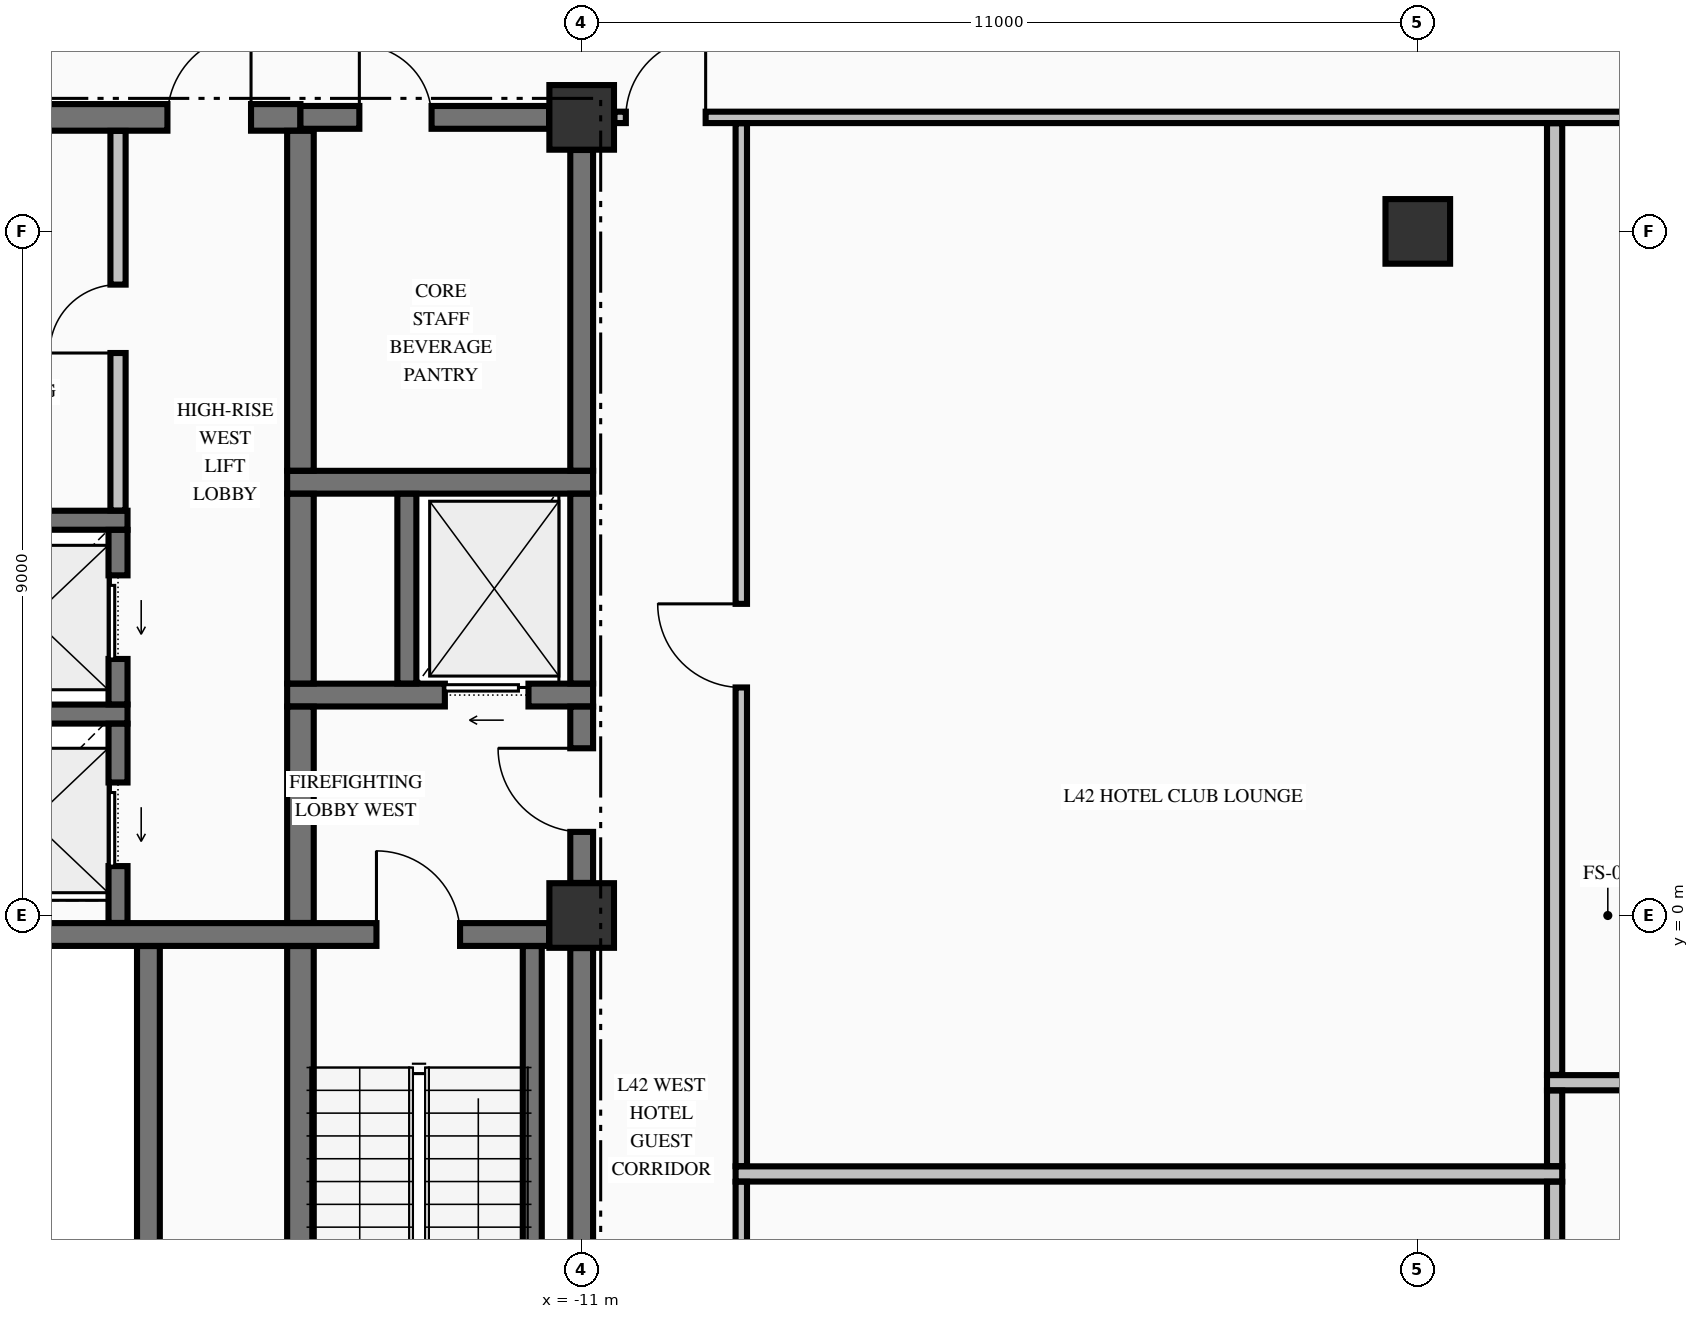
"""IFC4 building model, lengths in metres.
Left out: names, types, materials, properties, quantities, classifications, styles, units other than length and angle.
Written with IfcOpenShell. Run it as: python <this file> out.ifc"""

import sys

from ifc_helpers import new_model, si_unit, direction, frame, frame_2d, origin, origin_2d, place, context, subcontext, project, spatial, rectangle, extrude, element, fill, save


model = new_model("IFC4")
c1 = context("Model", 3, precision=1e-05, world=origin(), true_north=direction((0.0, 1.0)))
c2 = subcontext(c1, "Body", "Model", "MODEL_VIEW")
j1 = project(units=[si_unit("LENGTHUNIT", "METRE"), si_unit("PLANEANGLEUNIT", "RADIAN")], contexts=[c1])
p1 = place(None, origin())
s1 = spatial("IfcSite", under=j1, at=p1, CompositionType="ELEMENT")
p2 = place(p1, origin())
s2 = spatial("IfcBuilding", under=s1, at=p2, CompositionType="ELEMENT")
p3 = place(p2, frame((0.0, 0.0, 166.06)))
s3 = spatial("IfcBuildingStorey", under=s2, at=p3, CompositionType="ELEMENT", Elevation=166.06)
for number, where, z_axis, x_axis in (
    (1, (-11.0, 0.0, -0.25), (0.0, 0.0, 1.0), (1.0, 0.0, 0.0)),
    (2, (-11.0, 10.5, -0.25), (0.0, 0.0, 1.0), (1.0, 0.0, 0.0)),
    (3, (0.0, 9.0, -0.25), (0.0, 0.0, 1.0), (1.0, 0.0, 0.0)),
):
    element("IfcColumn", number, at=place(p3, frame(where, z_axis=z_axis, x_axis=x_axis)), inside=s3, PredefinedType="COLUMN", context=c2, shape_type="SweptSolid", body=[
        extrude(rectangle(XDim=0.85, YDim=0.85, at=origin_2d()), origin(), (0.0, 0.0, 1.0), 3.4),
    ])
p4 = place(p3, frame((-19.571, -0.25, 0.0), z_axis=(0.0, 0.0, 1.0), x_axis=(1.0, 0.0, 0.0)))
e4 = element("IfcWall", 4, at=p4, inside=s3, PredefinedType="SHEAR", context=c2, shape_type="SweptSolid", body=[
    extrude(rectangle(XDim=8.142, YDim=0.3, at=frame_2d((4.071, 0.0))), origin(), (0.0, 0.0, 1.0), 3.15),
])
p5 = place(p4, frame((5.871, 0.0, 0.0)))
e5 = element("IfcOpeningElement", 5, at=p5, cuts=e4, PredefinedType="OPENING", context=c2, shape_type="SweptSolid", body=[
    extrude(rectangle(XDim=1.1, YDim=2.15, at=frame_2d((0.55, 1.075))), frame((0.0, 0.16, 0.0), z_axis=(0.0, -1.0, 0.0), x_axis=(1.0, 0.0, 0.0)), (0.0, 0.0, 1.0), 0.32),
])
p6 = place(p3, frame((-20.175, 2.65, 0.0), z_axis=(0.0, 0.0, 1.0), x_axis=(1.0, 0.0, 0.0)))
e6 = element("IfcWall", 6, at=p6, inside=s3, PredefinedType="SOLIDWALL", context=c2, shape_type="SweptSolid", body=[
    extrude(rectangle(XDim=3.2, YDim=0.25, at=frame_2d((1.6, 0.0))), origin(), (0.0, 0.0, 1.0), 3.15),
])
p7 = place(p3, frame((-14.875, 2.9, 0.0), z_axis=(0.0, 0.0, 1.0), x_axis=(1.0, 0.0, 0.0)))
e7 = element("IfcWall", 7, at=p7, inside=s3, PredefinedType="SHEAR", context=c2, shape_type="SweptSolid", body=[
    extrude(rectangle(XDim=4.025, YDim=0.3, at=frame_2d((2.012, 0.0))), origin(), (0.0, 0.0, 1.0), 3.15),
])
p8 = place(p7, frame((2.075, 0.0, 0.0)))
e8 = element("IfcOpeningElement", 8, at=p8, cuts=e7, PredefinedType="OPENING", context=c2, shape_type="SweptSolid", body=[
    extrude(rectangle(XDim=1.1, YDim=2.2, at=frame_2d((0.55, 1.1))), frame((0.0, 0.16, 0.0), z_axis=(0.0, -1.0, 0.0), x_axis=(1.0, 0.0, 0.0)), (0.0, 0.0, 1.0), 0.32),
])
p9 = place(p3, frame((-20.175, 5.2, 0.0), z_axis=(0.0, 0.0, 1.0), x_axis=(1.0, 0.0, 0.0)))
e9 = element("IfcWall", 9, at=p9, inside=s3, PredefinedType="SOLIDWALL", context=c2, shape_type="SweptSolid", body=[
    extrude(rectangle(XDim=3.2, YDim=0.25, at=frame_2d((1.6, 0.0))), origin(), (0.0, 0.0, 1.0), 3.15),
])
p10 = place(p3, frame((-14.875, 5.7, 0.0), z_axis=(0.0, 0.0, 1.0), x_axis=(1.0, 0.0, 0.0)))
e10 = element("IfcWall", 10, at=p10, inside=s3, PredefinedType="SHEAR", context=c2, shape_type="SweptSolid", body=[
    extrude(rectangle(XDim=4.025, YDim=0.3, at=frame_2d((2.012, 0.0))), origin(), (0.0, 0.0, 1.0), 3.15),
])
p11 = place(p3, frame((-19.571, 10.5, 0.0), z_axis=(0.0, 0.0, 1.0), x_axis=(1.0, 0.0, 0.0)))
e11 = element("IfcWall", 11, at=p11, inside=s3, PredefinedType="SHEAR", context=c2, shape_type="SweptSolid", body=[
    extrude(rectangle(XDim=4.871, YDim=0.35, at=frame_2d((2.436, 0.0))), origin(), (0.0, 0.0, 1.0), 3.15),
])
p12 = place(p11, frame((3.121, 0.0, 0.0)))
e12 = element("IfcOpeningElement", 12, at=p12, cuts=e11, PredefinedType="OPENING", context=c2, shape_type="SweptSolid", body=[
    extrude(rectangle(XDim=1.1, YDim=2.15, at=frame_2d((0.55, 1.075))), frame((0.0, 0.185, 0.0), z_axis=(0.0, -1.0, 0.0), x_axis=(1.0, 0.0, 0.0)), (0.0, 0.0, 1.0), 0.37),
])
p13 = place(p3, frame((-14.7, 10.5, 0.0), z_axis=(0.0, 0.0, 1.0), x_axis=(1.0, 0.0, 0.0)))
e13 = element("IfcWall", 13, at=p13, inside=s3, PredefinedType="SHEAR", context=c2, shape_type="SweptSolid", body=[
    extrude(rectangle(XDim=3.271, YDim=0.3, at=frame_2d((1.635, 0.0))), origin(), (0.0, 0.0, 1.0), 3.15),
])
p14 = place(p13, frame((0.775, 0.0, 0.0)))
e14 = element("IfcOpeningElement", 14, at=p14, cuts=e13, PredefinedType="OPENING", context=c2, shape_type="SweptSolid", body=[
    extrude(rectangle(XDim=0.95, YDim=2.15, at=frame_2d((0.475, 1.075))), frame((0.0, 0.16, 0.0), z_axis=(0.0, -1.0, 0.0), x_axis=(1.0, 0.0, 0.0)), (0.0, 0.0, 1.0), 0.32),
])
p15 = place(p3, frame((-8.975, -3.4, 0.0), z_axis=(0.0, 0.0, 1.0), x_axis=(1.0, 0.0, 0.0)))
e15 = element("IfcWall", 15, at=p15, inside=s3, PredefinedType="PARTITIONING", context=c2, shape_type="SweptSolid", body=[
    extrude(rectangle(XDim=10.875, YDim=0.2, at=frame_2d((5.438, 0.0))), origin(), (0.0, 0.0, 1.0), 3.15),
])
p16 = place(p3, frame((1.7, -2.2, 0.0), z_axis=(0.0, 0.0, 1.0), x_axis=(1.0, 0.0, 0.0)))
e16 = element("IfcWall", 16, at=p16, inside=s3, PredefinedType="PARTITIONING", context=c2, shape_type="SweptSolid", body=[
    extrude(rectangle(XDim=7.275, YDim=0.2, at=frame_2d((3.638, 0.0))), origin(), (0.0, 0.0, 1.0), 3.15),
])
p17 = place(p3, frame((-10.569, 10.5, 0.0), z_axis=(0.0, 0.0, 1.0), x_axis=(1.0, 0.0, 0.0)))
e17 = element("IfcWall", 17, at=p17, inside=s3, PredefinedType="PARTITIONING", context=c2, shape_type="SweptSolid", body=[
    extrude(rectangle(XDim=21.138, YDim=0.15, at=frame_2d((10.569, 0.0))), origin(), (0.0, 0.0, 1.0), 3.15),
])
p18 = place(p17, frame((0.15, 0.0, 0.0)))
e18 = element("IfcOpeningElement", 18, at=p18, cuts=e17, PredefinedType="OPENING", context=c2, shape_type="SweptSolid", body=[
    extrude(rectangle(XDim=1.05, YDim=2.15, at=frame_2d((0.525, 1.075))), frame((0.0, 0.085, 0.0), z_axis=(0.0, -1.0, 0.0), x_axis=(1.0, 0.0, 0.0)), (0.0, 0.0, 1.0), 0.17),
])
p19 = place(p17, frame((19.938, 0.0, 0.0)))
e19 = element("IfcOpeningElement", 19, at=p19, cuts=e17, PredefinedType="OPENING", context=c2, shape_type="SweptSolid", body=[
    extrude(rectangle(XDim=1.05, YDim=2.15, at=frame_2d((0.525, 1.075))), frame((0.0, 0.085, 0.0), z_axis=(0.0, -1.0, 0.0), x_axis=(1.0, 0.0, 0.0)), (0.0, 0.0, 1.0), 0.17),
])
p20 = place(p3, frame((-17.1, -0.098, 0.0), z_axis=(0.0, 0.0, 1.0), x_axis=(0.0, 1.0, 0.0)))
e20 = element("IfcWall", 20, at=p20, inside=s3, PredefinedType="SOLIDWALL", context=c2, shape_type="SweptSolid", body=[
    extrude(rectangle(XDim=2.621, YDim=0.25, at=frame_2d((1.311, 0.0))), origin(), (0.0, 0.0, 1.0), 3.15),
])
p21 = place(p20, frame((0.748, 0.0, 0.0)))
e21 = element("IfcOpeningElement", 21, at=p21, cuts=e20, PredefinedType="OPENING", context=c2, shape_type="SweptSolid", body=[
    extrude(rectangle(XDim=1.1, YDim=2.2, at=frame_2d((0.55, 1.1))), frame((0.0, 0.135, 0.0), z_axis=(0.0, -1.0, 0.0), x_axis=(1.0, 0.0, 0.0)), (0.0, 0.0, 1.0), 0.27),
])
p22 = place(p3, frame((-17.1, 2.777, 0.0), z_axis=(0.0, 0.0, 1.0), x_axis=(0.0, 1.0, 0.0)))
e22 = element("IfcWall", 22, at=p22, inside=s3, PredefinedType="SOLIDWALL", context=c2, shape_type="SweptSolid", body=[
    extrude(rectangle(XDim=2.296, YDim=0.25, at=frame_2d((1.148, 0.0))), origin(), (0.0, 0.0, 1.0), 3.15),
])
p23 = place(p22, frame((0.598, 0.0, 0.0)))
e23 = element("IfcOpeningElement", 23, at=p23, cuts=e22, PredefinedType="OPENING", context=c2, shape_type="SweptSolid", body=[
    extrude(rectangle(XDim=1.1, YDim=2.2, at=frame_2d((0.55, 1.1))), frame((0.0, 0.135, 0.0), z_axis=(0.0, -1.0, 0.0), x_axis=(1.0, 0.0, 0.0)), (0.0, 0.0, 1.0), 0.27),
])
p24 = place(p3, frame((-16.7, -9.773, 0.0), z_axis=(0.0, 0.0, 1.0), x_axis=(0.0, 1.0, 0.0)))
e24 = element("IfcWall", 24, at=p24, inside=s3, PredefinedType="SHEAR", context=c2, shape_type="SweptSolid", body=[
    extrude(rectangle(XDim=9.371, YDim=0.3, at=frame_2d((4.686, 0.0))), origin(), (0.0, 0.0, 1.0), 3.15),
])
p25 = place(p3, frame((-14.7, -9.773, 0.0), z_axis=(0.0, 0.0, 1.0), x_axis=(0.0, 1.0, 0.0)))
e25 = element("IfcWall", 25, at=p25, inside=s3, PredefinedType="SHEAR", context=c2, shape_type="SweptSolid", body=[
    extrude(rectangle(XDim=9.371, YDim=0.35, at=frame_2d((4.686, 0.0))), origin(), (0.0, 0.0, 1.0), 3.15),
])
p26 = place(p3, frame((-14.7, -0.098, 0.0), z_axis=(0.0, 0.0, 1.0), x_axis=(0.0, 1.0, 0.0)))
e26 = element("IfcWall", 26, at=p26, inside=s3, PredefinedType="SHEAR", context=c2, shape_type="SweptSolid", body=[
    extrude(rectangle(XDim=2.846, YDim=0.35, at=frame_2d((1.423, 0.0))), origin(), (0.0, 0.0, 1.0), 3.15),
])
p27 = place(p3, frame((-14.7, 3.052, 0.0), z_axis=(0.0, 0.0, 1.0), x_axis=(0.0, 1.0, 0.0)))
e27 = element("IfcWall", 27, at=p27, inside=s3, PredefinedType="SHEAR", context=c2, shape_type="SweptSolid", body=[
    extrude(rectangle(XDim=2.496, YDim=0.35, at=frame_2d((1.248, 0.0))), origin(), (0.0, 0.0, 1.0), 3.15),
])
p28 = place(p3, frame((-14.7, 5.852, 0.0), z_axis=(0.0, 0.0, 1.0), x_axis=(0.0, 1.0, 0.0)))
e28 = element("IfcWall", 28, at=p28, inside=s3, PredefinedType="SHEAR", context=c2, shape_type="SweptSolid", body=[
    extrude(rectangle(XDim=4.471, YDim=0.35, at=frame_2d((2.235, 0.0))), origin(), (0.0, 0.0, 1.0), 3.15),
])
p29 = place(p3, frame((-13.3, 3.052, 0.0), z_axis=(0.0, 0.0, 1.0), x_axis=(0.0, 1.0, 0.0)))
e29 = element("IfcWall", 29, at=p29, inside=s3, PredefinedType="SOLIDWALL", context=c2, shape_type="SweptSolid", body=[
    extrude(rectangle(XDim=2.496, YDim=0.25, at=frame_2d((1.248, 0.0))), origin(), (0.0, 0.0, 1.0), 3.15),
])
p30 = place(p3, frame((-11.65, -9.798, 0.0), z_axis=(0.0, 0.0, 1.0), x_axis=(0.0, 1.0, 0.0)))
e30 = element("IfcWall", 30, at=p30, inside=s3, PredefinedType="SOLIDWALL", context=c2, shape_type="SweptSolid", body=[
    extrude(rectangle(XDim=9.396, YDim=0.25, at=frame_2d((4.698, 0.0))), origin(), (0.0, 0.0, 1.0), 3.15),
])
p31 = place(p3, frame((-11.0, -9.521, 0.0), z_axis=(0.0, 0.0, 1.0), x_axis=(0.0, 1.0, 0.0)))
e31 = element("IfcWall", 31, at=p31, inside=s3, PredefinedType="SHEAR", context=c2, shape_type="SweptSolid", body=[
    extrude(rectangle(XDim=9.092, YDim=0.3, at=frame_2d((4.546, 0.0))), origin(), (0.0, 0.0, 1.0), 3.15),
])
p32 = place(p3, frame((-11.0, 0.429, 0.0), z_axis=(0.0, 0.0, 1.0), x_axis=(0.0, 1.0, 0.0)))
e32 = element("IfcWall", 32, at=p32, inside=s3, PredefinedType="SHEAR", context=c2, shape_type="SweptSolid", body=[
    extrude(rectangle(XDim=2.319, YDim=0.3, at=frame_2d((1.16, 0.0))), origin(), (0.0, 0.0, 1.0), 3.15),
])
p33 = place(p32, frame((0.671, 0.0, 0.0)))
e33 = element("IfcOpeningElement", 33, at=p33, cuts=e32, PredefinedType="OPENING", context=c2, shape_type="SweptSolid", body=[
    extrude(rectangle(XDim=1.1, YDim=2.15, at=frame_2d((0.55, 1.075))), frame((0.0, 0.16, 0.0), z_axis=(0.0, -1.0, 0.0), x_axis=(1.0, 0.0, 0.0)), (0.0, 0.0, 1.0), 0.32),
])
p34 = place(p3, frame((-11.0, 3.052, 0.0), z_axis=(0.0, 0.0, 1.0), x_axis=(0.0, 1.0, 0.0)))
e34 = element("IfcWall", 34, at=p34, inside=s3, PredefinedType="SHEAR", context=c2, shape_type="SweptSolid", body=[
    extrude(rectangle(XDim=2.496, YDim=0.3, at=frame_2d((1.248, 0.0))), origin(), (0.0, 0.0, 1.0), 3.15),
])
p35 = place(p3, frame((-11.0, 5.852, 0.0), z_axis=(0.0, 0.0, 1.0), x_axis=(0.0, 1.0, 0.0)))
e35 = element("IfcWall", 35, at=p35, inside=s3, PredefinedType="SHEAR", context=c2, shape_type="SweptSolid", body=[
    extrude(rectangle(XDim=4.219, YDim=0.3, at=frame_2d((2.109, 0.0))), origin(), (0.0, 0.0, 1.0), 3.15),
])
p36 = place(p3, frame((-17.1, 5.328, 0.0), z_axis=(0.0, 0.0, 1.0), x_axis=(0.0, 1.0, 0.0)))
e36 = element("IfcWall", 36, at=p36, inside=s3, PredefinedType="PARTITIONING", context=c2, shape_type="SweptSolid", body=[
    extrude(rectangle(XDim=4.994, YDim=0.2, at=frame_2d((2.497, 0.0))), origin(), (0.0, 0.0, 1.0), 3.15),
])
p37 = place(p36, frame((2.072, 0.0, 0.0)))
e37 = element("IfcOpeningElement", 37, at=p37, cuts=e36, PredefinedType="OPENING", context=c2, shape_type="SweptSolid", body=[
    extrude(rectangle(XDim=0.9, YDim=2.15, at=frame_2d((0.45, 1.075))), frame((0.0, 0.11, 0.0), z_axis=(0.0, -1.0, 0.0), x_axis=(1.0, 0.0, 0.0)), (0.0, 0.0, 1.0), 0.22),
])
p38 = place(p3, frame((-8.9, -9.872, 0.0), z_axis=(0.0, 0.0, 1.0), x_axis=(0.0, 1.0, 0.0)))
e38 = element("IfcWall", 38, at=p38, inside=s3, PredefinedType="PARTITIONING", context=c2, shape_type="SweptSolid", body=[
    extrude(rectangle(XDim=6.369, YDim=0.15, at=frame_2d((3.185, 0.0))), origin(), (0.0, 0.0, 1.0), 3.15),
])
p39 = place(p38, frame((2.702, 0.0, 0.0)))
e39 = element("IfcOpeningElement", 39, at=p39, cuts=e38, PredefinedType="OPENING", context=c2, shape_type="SweptSolid", body=[
    extrude(rectangle(XDim=1.0, YDim=2.15, at=frame_2d((0.5, 1.075))), frame((0.0, 0.085, 0.0), z_axis=(0.0, -1.0, 0.0), x_axis=(1.0, 0.0, 0.0)), (0.0, 0.0, 1.0), 0.17),
])
p40 = place(p3, frame((-8.9, -3.297, 0.0), z_axis=(0.0, 0.0, 1.0), x_axis=(0.0, 1.0, 0.0)))
e40 = element("IfcWall", 40, at=p40, inside=s3, PredefinedType="PARTITIONING", context=c2, shape_type="SweptSolid", body=[
    extrude(rectangle(XDim=13.719, YDim=0.15, at=frame_2d((6.86, 0.0))), origin(), (0.0, 0.0, 1.0), 3.15),
])
p41 = place(p40, frame((6.297, 0.0, 0.0)))
e41 = element("IfcOpeningElement", 41, at=p41, cuts=e40, PredefinedType="OPENING", context=c2, shape_type="SweptSolid", body=[
    extrude(rectangle(XDim=1.1, YDim=2.15, at=frame_2d((0.55, 1.075))), frame((0.0, 0.085, 0.0), z_axis=(0.0, -1.0, 0.0), x_axis=(1.0, 0.0, 0.0)), (0.0, 0.0, 1.0), 0.17),
])
p42 = place(p3, frame((1.8, -5.097, 0.0), z_axis=(0.0, 0.0, 1.0), x_axis=(0.0, 1.0, 0.0)))
e42 = element("IfcWall", 42, at=p42, inside=s3, PredefinedType="PARTITIONING", context=c2, shape_type="SweptSolid", body=[
    extrude(rectangle(XDim=1.594, YDim=0.2, at=frame_2d((0.797, 0.0))), origin(), (0.0, 0.0, 1.0), 3.15),
])
p43 = place(p3, frame((1.8, -3.297, 0.0), z_axis=(0.0, 0.0, 1.0), x_axis=(0.0, 1.0, 0.0)))
e43 = element("IfcWall", 43, at=p43, inside=s3, PredefinedType="PARTITIONING", context=c2, shape_type="SweptSolid", body=[
    extrude(rectangle(XDim=0.994, YDim=0.2, at=frame_2d((0.497, 0.0))), origin(), (0.0, 0.0, 1.0), 3.15),
])
p44 = place(p3, frame((1.8, -2.097, 0.0), z_axis=(0.0, 0.0, 1.0), x_axis=(0.0, 1.0, 0.0)))
e44 = element("IfcWall", 44, at=p44, inside=s3, PredefinedType="PARTITIONING", context=c2, shape_type="SweptSolid", body=[
    extrude(rectangle(XDim=12.519, YDim=0.2, at=frame_2d((6.26, 0.0))), origin(), (0.0, 0.0, 1.0), 3.15),
])
p45 = place(p5, origin())
e45 = element("IfcDoor", 45, at=p45, inside=s3, OperationType="SINGLE_SWING_LEFT", PredefinedType="DOOR", context=c2, shape_type="SweptSolid", body=[
    extrude(rectangle(XDim=1.1, YDim=2.15, at=frame_2d((0.55, 1.075))), frame((0.0, 0.025, 0.0), z_axis=(0.0, -1.0, 0.0), x_axis=(1.0, 0.0, 0.0)), (0.0, 0.0, 1.0), 0.05),
])
fill(e5, e45)
p46 = place(p33, origin())
e46 = element("IfcDoor", 46, at=p46, inside=s3, OperationType="SINGLE_SWING_RIGHT", PredefinedType="DOOR", context=c2, shape_type="SweptSolid", body=[
    extrude(rectangle(XDim=1.1, YDim=2.15, at=frame_2d((0.55, 1.075))), frame((0.0, 0.025, 0.0), z_axis=(0.0, -1.0, 0.0), x_axis=(1.0, 0.0, 0.0)), (0.0, 0.0, 1.0), 0.05),
])
fill(e33, e46)
p47 = place(p8, origin())
e47 = element("IfcDoor", 47, at=p47, inside=s3, OperationType="SLIDING_TO_LEFT", PredefinedType="DOOR", context=c2, shape_type="SweptSolid", body=[
    extrude(rectangle(XDim=1.1, YDim=2.2, at=frame_2d((0.55, 1.1))), frame((0.0, 0.025, 0.0), z_axis=(0.0, -1.0, 0.0), x_axis=(1.0, 0.0, 0.0)), (0.0, 0.0, 1.0), 0.05),
])
fill(e8, e47)
p48 = place(p14, origin())
e48 = element("IfcDoor", 48, at=p48, inside=s3, OperationType="SINGLE_SWING_LEFT", PredefinedType="DOOR", context=c2, shape_type="SweptSolid", body=[
    extrude(rectangle(XDim=0.95, YDim=2.15, at=frame_2d((0.475, 1.075))), frame((0.0, 0.025, 0.0), z_axis=(0.0, -1.0, 0.0), x_axis=(1.0, 0.0, 0.0)), (0.0, 0.0, 1.0), 0.05),
])
fill(e14, e48)
p49 = place(p21, origin())
e49 = element("IfcDoor", 49, at=p49, inside=s3, OperationType="SLIDING_TO_LEFT", PredefinedType="DOOR", context=c2, shape_type="SweptSolid", body=[
    extrude(rectangle(XDim=1.1, YDim=2.2, at=frame_2d((0.55, 1.1))), frame((0.0, 0.025, 0.0), z_axis=(0.0, -1.0, 0.0), x_axis=(1.0, 0.0, 0.0)), (0.0, 0.0, 1.0), 0.05),
])
fill(e21, e49)
p50 = place(p23, origin())
e50 = element("IfcDoor", 50, at=p50, inside=s3, OperationType="SLIDING_TO_LEFT", PredefinedType="DOOR", context=c2, shape_type="SweptSolid", body=[
    extrude(rectangle(XDim=1.1, YDim=2.2, at=frame_2d((0.55, 1.1))), frame((0.0, 0.025, 0.0), z_axis=(0.0, -1.0, 0.0), x_axis=(1.0, 0.0, 0.0)), (0.0, 0.0, 1.0), 0.05),
])
fill(e23, e50)
p51 = place(p12, origin())
e51 = element("IfcDoor", 51, at=p51, inside=s3, OperationType="SINGLE_SWING_RIGHT", PredefinedType="DOOR", context=c2, shape_type="SweptSolid", body=[
    extrude(rectangle(XDim=1.1, YDim=2.15, at=frame_2d((0.55, 1.075))), frame((0.0, 0.025, 0.0), z_axis=(0.0, -1.0, 0.0), x_axis=(1.0, 0.0, 0.0)), (0.0, 0.0, 1.0), 0.05),
])
fill(e12, e51)
p52 = place(p37, origin())
e52 = element("IfcDoor", 52, at=p52, inside=s3, OperationType="SINGLE_SWING_LEFT", PredefinedType="DOOR", context=c2, shape_type="SweptSolid", body=[
    extrude(rectangle(XDim=0.9, YDim=2.15, at=frame_2d((0.45, 1.075))), frame((0.0, 0.025, 0.0), z_axis=(0.0, -1.0, 0.0), x_axis=(1.0, 0.0, 0.0)), (0.0, 0.0, 1.0), 0.05),
])
fill(e37, e52)
p53 = place(p18, origin())
e53 = element("IfcDoor", 53, at=p53, inside=s3, OperationType="SINGLE_SWING_RIGHT", PredefinedType="DOOR", context=c2, shape_type="SweptSolid", body=[
    extrude(rectangle(XDim=1.05, YDim=2.15, at=frame_2d((0.525, 1.075))), frame((0.0, 0.025, 0.0), z_axis=(0.0, -1.0, 0.0), x_axis=(1.0, 0.0, 0.0)), (0.0, 0.0, 1.0), 0.05),
])
fill(e18, e53)
p54 = place(p41, origin())
e54 = element("IfcDoor", 54, at=p54, inside=s3, OperationType="SINGLE_SWING_RIGHT", PredefinedType="DOOR", context=c2, shape_type="SweptSolid", body=[
    extrude(rectangle(XDim=1.1, YDim=2.15, at=frame_2d((0.55, 1.075))), frame((0.0, 0.025, 0.0), z_axis=(0.0, -1.0, 0.0), x_axis=(1.0, 0.0, 0.0)), (0.0, 0.0, 1.0), 0.05),
])
fill(e41, e54)
save(model, sys.argv[1])
